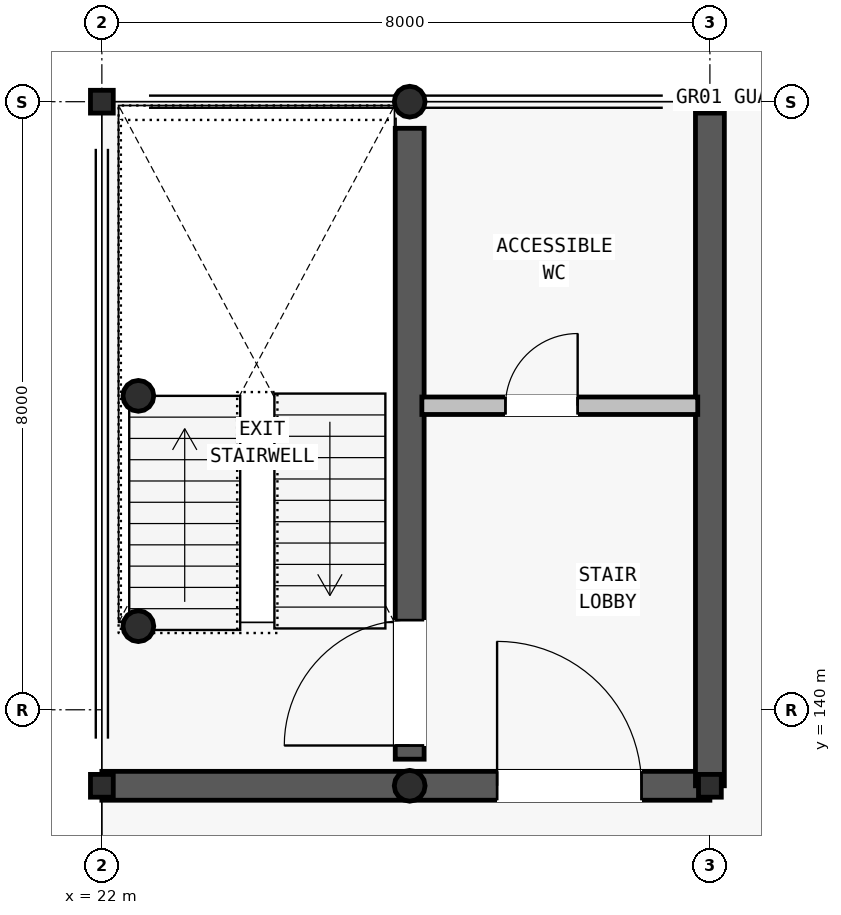
"""IFC4 building model, lengths in metres.
Left out: names, types, materials, properties, quantities, classifications, styles, units other than length and angle.
Written with IfcOpenShell. Run it as: python <this file> out.ifc"""

import sys

from ifc_helpers import new_model, si_unit, direction, frame, frame_2d, origin, origin_2d, place, context, subcontext, project, spatial, rectangle, hollow_circle, i_section, extrude, element, fill, save


model = new_model("IFC4")
c1 = context("Model", 3, precision=1e-05, world=origin(), true_north=direction((0.0, 1.0)))
c2 = subcontext(c1, "Body", "Model", "MODEL_VIEW")
j1 = project(units=[si_unit("LENGTHUNIT", "METRE"), si_unit("PLANEANGLEUNIT", "RADIAN")], contexts=[c1])
p1 = place(None, origin())
s1 = spatial("IfcSite", under=j1, at=p1, CompositionType="ELEMENT")
p2 = place(p1, origin())
s2 = spatial("IfcBuilding", under=s1, at=p2, CompositionType="ELEMENT")
p3 = place(p2, frame((0.0, 0.0, 9.5)))
s3 = spatial("IfcBuildingStorey", under=s2, at=p3, CompositionType="ELEMENT", Elevation=9.5)
for number, where, z_axis, x_axis in (
    (1, (22.0, 148.0, 0.0), (0.0, 0.0, 1.0), (1.0, 0.0, 0.0)),
    (2, (30.0, 148.0, 0.0), (0.0, 0.0, 1.0), (1.0, 0.0, 0.0)),
    (3, (22.0, 139.0, 0.0), (0.0, 0.0, 1.0), (1.0, 0.0, 0.0)),
    (4, (30.0, 139.0, 0.0), (0.0, 0.0, 1.0), (1.0, 0.0, 0.0)),
):
    element("IfcColumn", number, at=place(p3, frame(where, z_axis=z_axis, x_axis=x_axis)), inside=s3, PredefinedType="COLUMN", context=c2, shape_type="SweptSolid", body=[
        extrude(i_section(OverallWidth=0.3, OverallDepth=0.3, WebThickness=0.01, FlangeThickness=0.015, FilletRadius=0.018, at=origin_2d()), origin(), (0.0, 0.0, 1.0), 3.9),
    ])
for number, where, z_axis, x_axis in (
    (5, (26.05, 139.0, 0.0), (0.0, 0.0, 1.0), (1.0, 0.0, 0.0)),
    (6, (26.05, 148.0, 0.0), (0.0, 0.0, 1.0), (1.0, 0.0, 0.0)),
    (7, (22.48, 141.1, 0.0), (0.0, 0.0, 1.0), (1.0, 0.0, 0.0)),
    (8, (22.48, 144.13, 0.0), (0.0, 0.0, 1.0), (1.0, 0.0, 0.0)),
):
    element("IfcColumn", number, at=place(p3, frame(where, z_axis=z_axis, x_axis=x_axis)), inside=s3, PredefinedType="COLUMN", context=c2, shape_type="SweptSolid", body=[
        extrude(hollow_circle(Radius=0.203, WallThickness=0.014, at=origin_2d()), origin(), (0.0, 0.0, 1.0), 3.9),
    ])
p4 = place(p3, frame((22.0, 139.0, 0.0), z_axis=(0.0, 0.0, 1.0), x_axis=(1.0, 0.0, 0.0)))
e9 = element("IfcWall", 9, at=p4, inside=s3, PredefinedType="SHEAR", context=c2, shape_type="SweptSolid", body=[
    extrude(rectangle(XDim=8.0, YDim=0.38, at=frame_2d((4.0, 0.0))), origin(), (0.0, 0.0, 1.0), 3.62),
])
p5 = place(p4, frame((5.2, 0.0, 0.0)))
e10 = element("IfcOpeningElement", 10, at=p5, cuts=e9, PredefinedType="OPENING", context=c2, shape_type="SweptSolid", body=[
    extrude(rectangle(XDim=1.9, YDim=2.3, at=frame_2d((0.95, 1.15))), frame((0.0, 0.2, 0.0), z_axis=(0.0, -1.0, 0.0), x_axis=(1.0, 0.0, 0.0)), (0.0, 0.0, 1.0), 0.4),
])
p6 = place(p3, frame((30.0, 139.0, 0.0), z_axis=(0.0, 0.0, 1.0), x_axis=(0.0, 1.0, 0.0)))
e11 = element("IfcWall", 11, at=p6, inside=s3, PredefinedType="SHEAR", context=c2, shape_type="SweptSolid", body=[
    extrude(rectangle(XDim=9.0, YDim=0.38, at=frame_2d((4.5, 0.0))), origin(), (0.0, 0.0, 1.0), 3.62),
])
p7 = place(p3, frame((26.05, 139.35, 0.0), z_axis=(0.0, 0.0, 1.0), x_axis=(0.0, 1.0, 0.0)))
e12 = element("IfcWall", 12, at=p7, inside=s3, PredefinedType="SHEAR", context=c2, shape_type="SweptSolid", body=[
    extrude(rectangle(XDim=8.3, YDim=0.38, at=frame_2d((4.15, 0.0))), origin(), (0.0, 0.0, 1.0), 3.62),
])
p8 = place(p7, frame((0.18, 0.0, 0.0)))
e13 = element("IfcOpeningElement", 13, at=p8, cuts=e12, PredefinedType="OPENING", context=c2, shape_type="SweptSolid", body=[
    extrude(rectangle(XDim=1.65, YDim=2.2, at=frame_2d((0.825, 1.1))), frame((0.0, 0.2, 0.0), z_axis=(0.0, -1.0, 0.0), x_axis=(1.0, 0.0, 0.0)), (0.0, 0.0, 1.0), 0.4),
])
p9 = place(p3, frame((26.21, 144.0, 0.0), z_axis=(0.0, 0.0, 1.0), x_axis=(1.0, 0.0, 0.0)))
e14 = element("IfcWall", 14, at=p9, inside=s3, PredefinedType="PARTITIONING", context=c2, shape_type="SweptSolid", body=[
    extrude(rectangle(XDim=3.63, YDim=0.23, at=frame_2d((1.815, 0.0))), origin(), (0.0, 0.0, 1.0), 2.48),
])
p10 = place(p9, frame((1.1, 0.0, 0.0)))
e15 = element("IfcOpeningElement", 15, at=p10, cuts=e14, PredefinedType="OPENING", context=c2, shape_type="SweptSolid", body=[
    extrude(rectangle(XDim=0.95, YDim=2.1, at=frame_2d((0.475, 1.05))), frame((0.0, 0.125, 0.0), z_axis=(0.0, -1.0, 0.0), x_axis=(1.0, 0.0, 0.0)), (0.0, 0.0, 1.0), 0.25),
])
p11 = place(p5, origin())
e16 = element("IfcDoor", 16, at=p11, inside=s3, OperationType="SINGLE_SWING_LEFT", PredefinedType="DOOR", context=c2, shape_type="SweptSolid", body=[
    extrude(rectangle(XDim=1.9, YDim=2.3, at=frame_2d((0.95, 1.15))), frame((0.0, 0.025, 0.0), z_axis=(0.0, -1.0, 0.0), x_axis=(1.0, 0.0, 0.0)), (0.0, 0.0, 1.0), 0.05),
])
fill(e10, e16)
p12 = place(p8, origin())
e17 = element("IfcDoor", 17, at=p12, inside=s3, OperationType="SINGLE_SWING_LEFT", PredefinedType="DOOR", context=c2, shape_type="SweptSolid", body=[
    extrude(rectangle(XDim=1.65, YDim=2.2, at=frame_2d((0.825, 1.1))), frame((0.0, 0.025, 0.0), z_axis=(0.0, -1.0, 0.0), x_axis=(1.0, 0.0, 0.0)), (0.0, 0.0, 1.0), 0.05),
])
fill(e13, e17)
p13 = place(p10, origin())
e18 = element("IfcDoor", 18, at=p13, inside=s3, OperationType="SINGLE_SWING_RIGHT", PredefinedType="DOOR", context=c2, shape_type="SweptSolid", body=[
    extrude(rectangle(XDim=0.95, YDim=2.1, at=frame_2d((0.475, 1.05))), frame((0.0, 0.025, 0.0), z_axis=(0.0, -1.0, 0.0), x_axis=(1.0, 0.0, 0.0)), (0.0, 0.0, 1.0), 0.05),
])
fill(e15, e18)
save(model, sys.argv[1])
